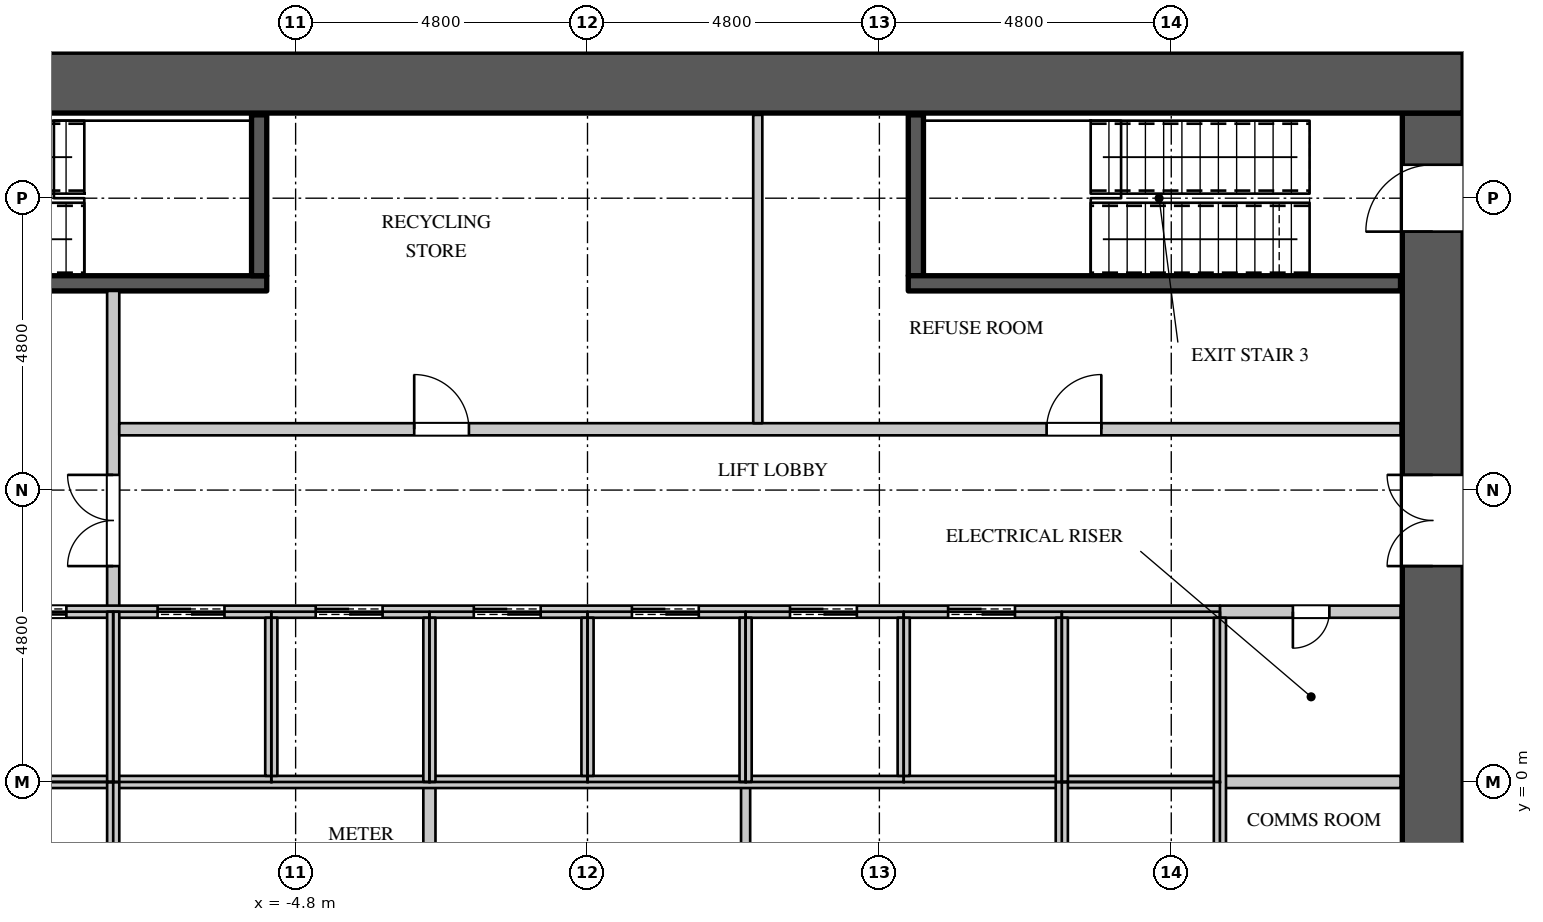
"""IFC4 building model, lengths in metres.
Left out: names, types, materials, properties, quantities, classifications, styles, units other than length and angle.
Written with IfcOpenShell. Run it as: python <this file> out.ifc"""

import sys

from ifc_helpers import new_model, si_unit, direction, frame, frame_2d, origin, place, context, subcontext, project, spatial, rectangle, extrude, element, fill, save


model = new_model("IFC4")
c1 = context("Model", 3, precision=1e-05, world=origin(), true_north=direction((0.0, 1.0)))
c2 = subcontext(c1, "Body", "Model", "MODEL_VIEW")
j1 = project(units=[si_unit("LENGTHUNIT", "METRE"), si_unit("PLANEANGLEUNIT", "RADIAN")], contexts=[c1])
p1 = place(None, origin())
s1 = spatial("IfcSite", under=j1, at=p1, CompositionType="ELEMENT")
p2 = place(p1, origin())
s2 = spatial("IfcBuilding", under=s1, at=p2, CompositionType="ELEMENT")
p3 = place(p2, frame((0.0, 0.0, 96.9)))
s3 = spatial("IfcBuildingStorey", under=s2, at=p3, CompositionType="ELEMENT", Elevation=96.9)
p4 = place(p3, frame((-14.4, 11.5, 0.0), z_axis=(0.0, 0.0, 1.0), x_axis=(1.0, 0.0, 0.0)))
e1 = element("IfcWall", 1, at=p4, inside=s3, PredefinedType="SHEAR", context=c2, shape_type="SweptSolid", body=[
    extrude(rectangle(XDim=28.8, YDim=1.0, at=frame_2d((14.4, 0.0))), origin(), (0.0, 0.0, 1.0), 4.2),
])
p5 = place(p3, frame((13.9, -11.0, 0.0), z_axis=(0.0, 0.0, 1.0), x_axis=(0.0, 1.0, 0.0)))
e2 = element("IfcWall", 2, at=p5, inside=s3, PredefinedType="SHEAR", context=c2, shape_type="SweptSolid", body=[
    extrude(rectangle(XDim=22.0, YDim=1.0, at=frame_2d((11.0, 0.0))), origin(), (0.0, 0.0, 1.0), 4.2),
])
p6 = place(p5, frame((20.05, 0.0, 0.0)))
e3 = element("IfcOpeningElement", 3, at=p6, cuts=e2, PredefinedType="OPENING", context=c2, shape_type="SweptSolid", body=[
    extrude(rectangle(XDim=1.1, YDim=2.2, at=frame_2d((0.55, 1.1))), frame((0.0, 0.51, 0.0), z_axis=(0.0, -1.0, 0.0), x_axis=(1.0, 0.0, 0.0)), (0.0, 0.0, 1.0), 1.02),
])
p7 = place(p5, frame((0.85, 0.0, 0.0)))
e4 = element("IfcOpeningElement", 4, at=p7, cuts=e2, PredefinedType="OPENING", context=c2, shape_type="SweptSolid", body=[
    extrude(rectangle(XDim=1.1, YDim=2.2, at=frame_2d((0.55, 1.1))), frame((0.0, 0.51, 0.0), z_axis=(0.0, -1.0, 0.0), x_axis=(1.0, 0.0, 0.0)), (0.0, 0.0, 1.0), 1.02),
])
p8 = place(p5, frame((14.55, 0.0, 0.0)))
e5 = element("IfcOpeningElement", 5, at=p8, cuts=e2, PredefinedType="OPENING", context=c2, shape_type="SweptSolid", body=[
    extrude(rectangle(XDim=1.5, YDim=2.4, at=frame_2d((0.75, 1.2))), frame((0.0, 0.51, 0.0), z_axis=(0.0, -1.0, 0.0), x_axis=(1.0, 0.0, 0.0)), (0.0, 0.0, 1.0), 1.02),
])
p9 = place(p5, frame((5.95, 0.0, 0.0)))
e6 = element("IfcOpeningElement", 6, at=p9, cuts=e2, PredefinedType="OPENING", context=c2, shape_type="SweptSolid", body=[
    extrude(rectangle(XDim=1.5, YDim=2.4, at=frame_2d((0.75, 1.2))), frame((0.0, 0.51, 0.0), z_axis=(0.0, -1.0, 0.0), x_axis=(1.0, 0.0, 0.0)), (0.0, 0.0, 1.0), 1.02),
])
p10 = place(p3, frame((-7.8, 2.8, 0.0), z_axis=(0.0, 0.0, 1.0), x_axis=(0.0, 1.0, 0.0)))
e7 = element("IfcWall", 7, at=p10, inside=s3, PredefinedType="PARTITIONING", context=c2, shape_type="SweptSolid", body=[
    extrude(rectangle(XDim=5.275, YDim=0.2, at=frame_2d((2.637, 0.0))), origin(), (0.0, 0.0, 1.0), 3.798),
])
p11 = place(p10, frame((0.75, 0.0, 0.0)))
e8 = element("IfcOpeningElement", 8, at=p11, cuts=e7, PredefinedType="OPENING", context=c2, shape_type="SweptSolid", body=[
    extrude(rectangle(XDim=1.5, YDim=2.4, at=frame_2d((0.75, 1.2))), frame((0.0, 0.11, 0.0), z_axis=(0.0, -1.0, 0.0), x_axis=(1.0, 0.0, 0.0)), (0.0, 0.0, 1.0), 0.22),
])
p12 = place(p3, frame((-7.7, 5.8, 0.0), z_axis=(0.0, 0.0, 1.0), x_axis=(1.0, 0.0, 0.0)))
e9 = element("IfcWall", 9, at=p12, inside=s3, PredefinedType="PARTITIONING", context=c2, shape_type="SweptSolid", body=[
    extrude(rectangle(XDim=21.07, YDim=0.2, at=frame_2d((10.535, 0.0))), origin(), (0.0, 0.0, 1.0), 3.798),
])
p13 = place(p12, frame((4.85, 0.0, 0.0)))
e10 = element("IfcOpeningElement", 10, at=p13, cuts=e9, PredefinedType="OPENING", context=c2, shape_type="SweptSolid", body=[
    extrude(rectangle(XDim=0.9, YDim=2.2, at=frame_2d((0.45, 1.1))), frame((0.0, 0.11, 0.0), z_axis=(0.0, -1.0, 0.0), x_axis=(1.0, 0.0, 0.0)), (0.0, 0.0, 1.0), 0.22),
])
p14 = place(p12, frame((15.25, 0.0, 0.0)))
e11 = element("IfcOpeningElement", 11, at=p14, cuts=e9, PredefinedType="OPENING", context=c2, shape_type="SweptSolid", body=[
    extrude(rectangle(XDim=0.9, YDim=2.2, at=frame_2d((0.45, 1.1))), frame((0.0, 0.11, 0.0), z_axis=(0.0, -1.0, 0.0), x_axis=(1.0, 0.0, 0.0)), (0.0, 0.0, 1.0), 0.22),
])
p15 = place(p3, frame((2.6, -2.7, 0.0), z_axis=(0.0, 0.0, 1.0), x_axis=(0.0, 1.0, 0.0)))
e12 = element("IfcWall", 12, at=p15, inside=s3, PredefinedType="PARTITIONING", context=c2, shape_type="SweptSolid", body=[
    extrude(rectangle(XDim=2.7, YDim=0.15, at=frame_2d((1.35, 0.0))), origin(), (0.0, 0.0, 1.0), 3.798),
])
p16 = place(p3, frame((2.8, 5.9, 0.0), z_axis=(0.0, 0.0, 1.0), x_axis=(0.0, 1.0, 0.0)))
e13 = element("IfcWall", 13, at=p16, inside=s3, PredefinedType="PARTITIONING", context=c2, shape_type="SweptSolid", body=[
    extrude(rectangle(XDim=5.07, YDim=0.15, at=frame_2d((2.535, 0.0))), origin(), (0.0, 0.0, 1.0), 3.798),
])
p17 = place(p3, frame((-2.6, -2.7, 0.0), z_axis=(0.0, 0.0, 1.0), x_axis=(0.0, 1.0, 0.0)))
e14 = element("IfcWall", 14, at=p17, inside=s3, PredefinedType="PARTITIONING", context=c2, shape_type="SweptSolid", body=[
    extrude(rectangle(XDim=2.7, YDim=0.2, at=frame_2d((1.35, 0.0))), origin(), (0.0, 0.0, 1.0), 3.798),
])
p18 = place(p3, frame((10.4, 2.8, 0.0), z_axis=(0.0, 0.0, 1.0), x_axis=(1.0, 0.0, 0.0)))
e15 = element("IfcWall", 15, at=p18, inside=s3, PredefinedType="PARTITIONING", context=c2, shape_type="SweptSolid", body=[
    extrude(rectangle(XDim=2.97, YDim=0.2, at=frame_2d((1.485, 0.0))), origin(), (0.0, 0.0, 1.0), 3.798),
])
p19 = place(p18, frame((1.2, 0.0, 0.0)))
e16 = element("IfcOpeningElement", 16, at=p19, cuts=e15, PredefinedType="OPENING", context=c2, shape_type="SweptSolid", body=[
    extrude(rectangle(XDim=0.6, YDim=2.0, at=frame_2d((0.3, 1.0))), frame((0.0, 0.11, 0.0), z_axis=(0.0, -1.0, 0.0), x_axis=(1.0, 0.0, 0.0)), (0.0, 0.0, 1.0), 0.22),
])
p20 = place(p3, frame((10.4, 0.0, 0.0), z_axis=(0.0, 0.0, 1.0), x_axis=(1.0, 0.0, 0.0)))
e17 = element("IfcWall", 17, at=p20, inside=s3, PredefinedType="PARTITIONING", context=c2, shape_type="SweptSolid", body=[
    extrude(rectangle(XDim=2.97, YDim=0.2, at=frame_2d((1.485, 0.0))), origin(), (0.0, 0.0, 1.0), 3.798),
])
p21 = place(p3, frame((-13.37, 0.0, 0.0), z_axis=(0.0, 0.0, 1.0), x_axis=(1.0, 0.0, 0.0)))
e18 = element("IfcWall", 18, at=p21, inside=s3, PredefinedType="PARTITIONING", context=c2, shape_type="SweptSolid", body=[
    extrude(rectangle(XDim=23.77, YDim=0.2, at=frame_2d((11.885, 0.0))), origin(), (0.0, 0.0, 1.0), 3.798),
])
p22 = place(p3, frame((-13.37, 2.8, 0.0), z_axis=(0.0, 0.0, 1.0), x_axis=(1.0, 0.0, 0.0)))
e19 = element("IfcWall", 19, at=p22, inside=s3, PredefinedType="PARTITIONING", context=c2, shape_type="SweptSolid", body=[
    extrude(rectangle(XDim=23.77, YDim=0.2, at=frame_2d((11.885, 0.0))), origin(), (0.0, 0.0, 1.0), 3.798),
])
p23 = place(p22, frame((0.9, 0.0, 0.0)))
e20 = element("IfcOpeningElement", 20, at=p23, cuts=e19, PredefinedType="OPENING", context=c2, shape_type="SweptSolid", body=[
    extrude(rectangle(XDim=1.1, YDim=2.2, at=frame_2d((0.55, 1.1))), frame((0.0, 0.11, 0.0), z_axis=(0.0, -1.0, 0.0), x_axis=(1.0, 0.0, 0.0)), (0.0, 0.0, 1.0), 0.22),
])
p24 = place(p22, frame((3.7, 0.0, 0.0)))
e21 = element("IfcOpeningElement", 21, at=p24, cuts=e19, PredefinedType="OPENING", context=c2, shape_type="SweptSolid", body=[
    extrude(rectangle(XDim=1.1, YDim=2.2, at=frame_2d((0.55, 1.1))), frame((0.0, 0.11, 0.0), z_axis=(0.0, -1.0, 0.0), x_axis=(1.0, 0.0, 0.0)), (0.0, 0.0, 1.0), 0.22),
])
p25 = place(p22, frame((6.3, 0.0, 0.0)))
e22 = element("IfcOpeningElement", 22, at=p25, cuts=e19, PredefinedType="OPENING", context=c2, shape_type="SweptSolid", body=[
    extrude(rectangle(XDim=1.1, YDim=2.2, at=frame_2d((0.55, 1.1))), frame((0.0, 0.11, 0.0), z_axis=(0.0, -1.0, 0.0), x_axis=(1.0, 0.0, 0.0)), (0.0, 0.0, 1.0), 0.22),
])
p26 = place(p22, frame((8.9, 0.0, 0.0)))
e23 = element("IfcOpeningElement", 23, at=p26, cuts=e19, PredefinedType="OPENING", context=c2, shape_type="SweptSolid", body=[
    extrude(rectangle(XDim=1.1, YDim=2.2, at=frame_2d((0.55, 1.1))), frame((0.0, 0.11, 0.0), z_axis=(0.0, -1.0, 0.0), x_axis=(1.0, 0.0, 0.0)), (0.0, 0.0, 1.0), 0.22),
])
p27 = place(p22, frame((11.5, 0.0, 0.0)))
e24 = element("IfcOpeningElement", 24, at=p27, cuts=e19, PredefinedType="OPENING", context=c2, shape_type="SweptSolid", body=[
    extrude(rectangle(XDim=1.1, YDim=2.2, at=frame_2d((0.55, 1.1))), frame((0.0, 0.11, 0.0), z_axis=(0.0, -1.0, 0.0), x_axis=(1.0, 0.0, 0.0)), (0.0, 0.0, 1.0), 0.22),
])
p28 = place(p22, frame((14.1, 0.0, 0.0)))
e25 = element("IfcOpeningElement", 25, at=p28, cuts=e19, PredefinedType="OPENING", context=c2, shape_type="SweptSolid", body=[
    extrude(rectangle(XDim=1.1, YDim=2.2, at=frame_2d((0.55, 1.1))), frame((0.0, 0.11, 0.0), z_axis=(0.0, -1.0, 0.0), x_axis=(1.0, 0.0, 0.0)), (0.0, 0.0, 1.0), 0.22),
])
p29 = place(p22, frame((16.7, 0.0, 0.0)))
e26 = element("IfcOpeningElement", 26, at=p29, cuts=e19, PredefinedType="OPENING", context=c2, shape_type="SweptSolid", body=[
    extrude(rectangle(XDim=1.1, YDim=2.2, at=frame_2d((0.55, 1.1))), frame((0.0, 0.11, 0.0), z_axis=(0.0, -1.0, 0.0), x_axis=(1.0, 0.0, 0.0)), (0.0, 0.0, 1.0), 0.22),
])
p30 = place(p22, frame((19.3, 0.0, 0.0)))
e27 = element("IfcOpeningElement", 27, at=p30, cuts=e19, PredefinedType="OPENING", context=c2, shape_type="SweptSolid", body=[
    extrude(rectangle(XDim=1.1, YDim=2.2, at=frame_2d((0.55, 1.1))), frame((0.0, 0.11, 0.0), z_axis=(0.0, -1.0, 0.0), x_axis=(1.0, 0.0, 0.0)), (0.0, 0.0, 1.0), 0.22),
])
for number, where, z_axis, x_axis in (
    (28, (-7.8, -2.8, 0.0), (0.0, 0.0, 1.0), (0.0, 1.0, 0.0)),
    (29, (-7.8, 0.0, 0.0), (0.0, 0.0, 1.0), (0.0, 1.0, 0.0)),
):
    element("IfcWall", number, at=place(p3, frame(where, z_axis=z_axis, x_axis=x_axis)), inside=s3, PredefinedType="PARTITIONING", context=c2, shape_type="SweptSolid", body=[
        extrude(rectangle(XDim=2.8, YDim=0.2, at=frame_2d((1.4, 0.0))), origin(), (0.0, 0.0, 1.0), 3.798),
    ])
p31 = place(p3, frame((-5.2, 0.1, 0.0), z_axis=(0.0, 0.0, 1.0), x_axis=(0.0, 1.0, 0.0)))
e30 = element("IfcWall", 30, at=p31, inside=s3, PredefinedType="PARTITIONING", context=c2, shape_type="SweptSolid", body=[
    extrude(rectangle(XDim=2.6, YDim=0.2, at=frame_2d((1.3, 0.0))), origin(), (0.0, 0.0, 1.0), 3.798),
])
p32 = place(p3, frame((-2.6, 0.0, 0.0), z_axis=(0.0, 0.0, 1.0), x_axis=(0.0, 1.0, 0.0)))
e31 = element("IfcWall", 31, at=p32, inside=s3, PredefinedType="PARTITIONING", context=c2, shape_type="SweptSolid", body=[
    extrude(rectangle(XDim=2.7, YDim=0.2, at=frame_2d((1.35, 0.0))), origin(), (0.0, 0.0, 1.0), 3.798),
])
p33 = place(p3, frame((0.0, 0.1, 0.0), z_axis=(0.0, 0.0, 1.0), x_axis=(0.0, 1.0, 0.0)))
e32 = element("IfcWall", 32, at=p33, inside=s3, PredefinedType="PARTITIONING", context=c2, shape_type="SweptSolid", body=[
    extrude(rectangle(XDim=2.6, YDim=0.2, at=frame_2d((1.3, 0.0))), origin(), (0.0, 0.0, 1.0), 3.798),
])
p34 = place(p3, frame((2.6, 0.0, 0.0), z_axis=(0.0, 0.0, 1.0), x_axis=(0.0, 1.0, 0.0)))
e33 = element("IfcWall", 33, at=p34, inside=s3, PredefinedType="PARTITIONING", context=c2, shape_type="SweptSolid", body=[
    extrude(rectangle(XDim=2.7, YDim=0.2, at=frame_2d((1.35, 0.0))), origin(), (0.0, 0.0, 1.0), 3.798),
])
p35 = place(p3, frame((5.2, 0.1, 0.0), z_axis=(0.0, 0.0, 1.0), x_axis=(0.0, 1.0, 0.0)))
e34 = element("IfcWall", 34, at=p35, inside=s3, PredefinedType="PARTITIONING", context=c2, shape_type="SweptSolid", body=[
    extrude(rectangle(XDim=2.6, YDim=0.2, at=frame_2d((1.3, 0.0))), origin(), (0.0, 0.0, 1.0), 3.798),
])
for number, where, z_axis, x_axis in (
    (35, (7.8, -2.7, 0.0), (0.0, 0.0, 1.0), (0.0, 1.0, 0.0)),
    (36, (7.8, 0.0, 0.0), (0.0, 0.0, 1.0), (0.0, 1.0, 0.0)),
):
    element("IfcWall", number, at=place(p3, frame(where, z_axis=z_axis, x_axis=x_axis)), inside=s3, PredefinedType="PARTITIONING", context=c2, shape_type="SweptSolid", body=[
        extrude(rectangle(XDim=2.7, YDim=0.2, at=frame_2d((1.35, 0.0))), origin(), (0.0, 0.0, 1.0), 3.798),
    ])
p36 = place(p3, frame((10.4, -2.7, 0.0), z_axis=(0.0, 0.0, 1.0), x_axis=(0.0, 1.0, 0.0)))
e37 = element("IfcWall", 37, at=p36, inside=s3, PredefinedType="PARTITIONING", context=c2, shape_type="SweptSolid", body=[
    extrude(rectangle(XDim=5.4, YDim=0.2, at=frame_2d((2.7, 0.0))), origin(), (0.0, 0.0, 1.0), 3.798),
])
p37 = place(p3, frame((-13.37, 8.2, 0.0), z_axis=(0.0, 0.0, 1.0), x_axis=(1.0, 0.0, 0.0)))
e38 = element("IfcWall", 38, at=p37, inside=s3, PredefinedType="SHEAR", context=c2, shape_type="SweptSolid", body=[
    extrude(rectangle(XDim=8.095, YDim=0.25, at=frame_2d((4.048, 0.0))), origin(), (0.0, 0.0, 1.0), 3.798),
])
p38 = place(p37, frame((0.15, 0.0, 0.0)))
e39 = element("IfcOpeningElement", 39, at=p38, cuts=e38, PredefinedType="OPENING", context=c2, shape_type="SweptSolid", body=[
    extrude(rectangle(XDim=1.1, YDim=2.2, at=frame_2d((0.55, 1.1))), frame((0.0, 0.135, 0.0), z_axis=(0.0, -1.0, 0.0), x_axis=(1.0, 0.0, 0.0)), (0.0, 0.0, 1.0), 0.27),
])
for number, where, z_axis, x_axis in (
    (40, (-5.4, 8.325, 0.0), (0.0, 0.0, 1.0), (0.0, 1.0, 0.0)),
    (41, (5.4, 8.325, 0.0), (0.0, 0.0, 1.0), (0.0, 1.0, 0.0)),
):
    element("IfcWall", number, at=place(p3, frame(where, z_axis=z_axis, x_axis=x_axis)), inside=s3, PredefinedType="SHEAR", context=c2, shape_type="SweptSolid", body=[
        extrude(rectangle(XDim=2.645, YDim=0.25, at=frame_2d((1.323, 0.0))), origin(), (0.0, 0.0, 1.0), 3.798),
    ])
p39 = place(p3, frame((5.275, 8.2, 0.0), z_axis=(0.0, 0.0, 1.0), x_axis=(1.0, 0.0, 0.0)))
e42 = element("IfcWall", 42, at=p39, inside=s3, PredefinedType="SHEAR", context=c2, shape_type="SweptSolid", body=[
    extrude(rectangle(XDim=8.095, YDim=0.25, at=frame_2d((4.048, 0.0))), origin(), (0.0, 0.0, 1.0), 3.798),
])
p40 = place(p19, origin())
e43 = element("IfcDoor", 43, at=p40, inside=s3, OperationType="SINGLE_SWING_RIGHT", PredefinedType="DOOR", context=c2, shape_type="SweptSolid", body=[
    extrude(rectangle(XDim=0.6, YDim=2.0, at=frame_2d((0.3, 1.0))), frame((0.0, 0.025, 0.0), z_axis=(0.0, -1.0, 0.0), x_axis=(1.0, 0.0, 0.0)), (0.0, 0.0, 1.0), 0.05),
])
fill(e16, e43)
p41 = place(p13, origin())
e44 = element("IfcDoor", 44, at=p41, inside=s3, OperationType="SINGLE_SWING_LEFT", PredefinedType="DOOR", context=c2, shape_type="SweptSolid", body=[
    extrude(rectangle(XDim=0.9, YDim=2.2, at=frame_2d((0.45, 1.1))), frame((0.0, 0.025, 0.0), z_axis=(0.0, -1.0, 0.0), x_axis=(1.0, 0.0, 0.0)), (0.0, 0.0, 1.0), 0.05),
])
fill(e10, e44)
p42 = place(p14, origin())
e45 = element("IfcDoor", 45, at=p42, inside=s3, OperationType="SINGLE_SWING_RIGHT", PredefinedType="DOOR", context=c2, shape_type="SweptSolid", body=[
    extrude(rectangle(XDim=0.9, YDim=2.2, at=frame_2d((0.45, 1.1))), frame((0.0, 0.025, 0.0), z_axis=(0.0, -1.0, 0.0), x_axis=(1.0, 0.0, 0.0)), (0.0, 0.0, 1.0), 0.05),
])
fill(e11, e45)
p43 = place(p24, origin())
e46 = element("IfcDoor", 46, at=p43, inside=s3, OperationType="DOUBLE_DOOR_SLIDING", PredefinedType="DOOR", context=c2, shape_type="SweptSolid", body=[
    extrude(rectangle(XDim=1.1, YDim=2.2, at=frame_2d((0.55, 1.1))), frame((0.0, 0.025, 0.0), z_axis=(0.0, -1.0, 0.0), x_axis=(1.0, 0.0, 0.0)), (0.0, 0.0, 1.0), 0.05),
])
fill(e21, e46)
p44 = place(p25, origin())
e47 = element("IfcDoor", 47, at=p44, inside=s3, OperationType="DOUBLE_DOOR_SLIDING", PredefinedType="DOOR", context=c2, shape_type="SweptSolid", body=[
    extrude(rectangle(XDim=1.1, YDim=2.2, at=frame_2d((0.55, 1.1))), frame((0.0, 0.025, 0.0), z_axis=(0.0, -1.0, 0.0), x_axis=(1.0, 0.0, 0.0)), (0.0, 0.0, 1.0), 0.05),
])
fill(e22, e47)
p45 = place(p26, origin())
e48 = element("IfcDoor", 48, at=p45, inside=s3, OperationType="DOUBLE_DOOR_SLIDING", PredefinedType="DOOR", context=c2, shape_type="SweptSolid", body=[
    extrude(rectangle(XDim=1.1, YDim=2.2, at=frame_2d((0.55, 1.1))), frame((0.0, 0.025, 0.0), z_axis=(0.0, -1.0, 0.0), x_axis=(1.0, 0.0, 0.0)), (0.0, 0.0, 1.0), 0.05),
])
fill(e23, e48)
p46 = place(p27, origin())
e49 = element("IfcDoor", 49, at=p46, inside=s3, OperationType="DOUBLE_DOOR_SLIDING", PredefinedType="DOOR", context=c2, shape_type="SweptSolid", body=[
    extrude(rectangle(XDim=1.1, YDim=2.2, at=frame_2d((0.55, 1.1))), frame((0.0, 0.025, 0.0), z_axis=(0.0, -1.0, 0.0), x_axis=(1.0, 0.0, 0.0)), (0.0, 0.0, 1.0), 0.05),
])
fill(e24, e49)
p47 = place(p28, origin())
e50 = element("IfcDoor", 50, at=p47, inside=s3, OperationType="DOUBLE_DOOR_SLIDING", PredefinedType="DOOR", context=c2, shape_type="SweptSolid", body=[
    extrude(rectangle(XDim=1.1, YDim=2.2, at=frame_2d((0.55, 1.1))), frame((0.0, 0.025, 0.0), z_axis=(0.0, -1.0, 0.0), x_axis=(1.0, 0.0, 0.0)), (0.0, 0.0, 1.0), 0.05),
])
fill(e25, e50)
p48 = place(p29, origin())
e51 = element("IfcDoor", 51, at=p48, inside=s3, OperationType="DOUBLE_DOOR_SLIDING", PredefinedType="DOOR", context=c2, shape_type="SweptSolid", body=[
    extrude(rectangle(XDim=1.1, YDim=2.2, at=frame_2d((0.55, 1.1))), frame((0.0, 0.025, 0.0), z_axis=(0.0, -1.0, 0.0), x_axis=(1.0, 0.0, 0.0)), (0.0, 0.0, 1.0), 0.05),
])
fill(e26, e51)
p49 = place(p30, origin())
e52 = element("IfcDoor", 52, at=p49, inside=s3, OperationType="DOUBLE_DOOR_SLIDING", PredefinedType="DOOR", context=c2, shape_type="SweptSolid", body=[
    extrude(rectangle(XDim=1.1, YDim=2.2, at=frame_2d((0.55, 1.1))), frame((0.0, 0.025, 0.0), z_axis=(0.0, -1.0, 0.0), x_axis=(1.0, 0.0, 0.0)), (0.0, 0.0, 1.0), 0.05),
])
fill(e27, e52)
p50 = place(p11, origin())
e53 = element("IfcDoor", 53, at=p50, inside=s3, OperationType="DOUBLE_DOOR_SINGLE_SWING", PredefinedType="DOOR", context=c2, shape_type="SweptSolid", body=[
    extrude(rectangle(XDim=1.5, YDim=2.4, at=frame_2d((0.75, 1.2))), frame((0.0, 0.025, 0.0), z_axis=(0.0, -1.0, 0.0), x_axis=(1.0, 0.0, 0.0)), (0.0, 0.0, 1.0), 0.05),
])
fill(e8, e53)
p51 = place(p6, origin())
e54 = element("IfcDoor", 54, at=p51, inside=s3, OperationType="SINGLE_SWING_LEFT", PredefinedType="DOOR", context=c2, shape_type="SweptSolid", body=[
    extrude(rectangle(XDim=1.1, YDim=2.2, at=frame_2d((0.55, 1.1))), frame((0.0, 0.495, 0.0), z_axis=(0.0, -1.0, 0.0), x_axis=(1.0, 0.0, 0.0)), (0.0, 0.0, 1.0), 0.05),
])
fill(e3, e54)
p52 = place(p8, origin())
e55 = element("IfcDoor", 55, at=p52, inside=s3, OperationType="DOUBLE_DOOR_SINGLE_SWING", PredefinedType="DOOR", context=c2, shape_type="SweptSolid", body=[
    extrude(rectangle(XDim=1.5, YDim=2.4, at=frame_2d((0.75, 1.2))), frame((0.0, 0.495, 0.0), z_axis=(0.0, -1.0, 0.0), x_axis=(1.0, 0.0, 0.0)), (0.0, 0.0, 1.0), 0.05),
])
fill(e5, e55)
save(model, sys.argv[1])
